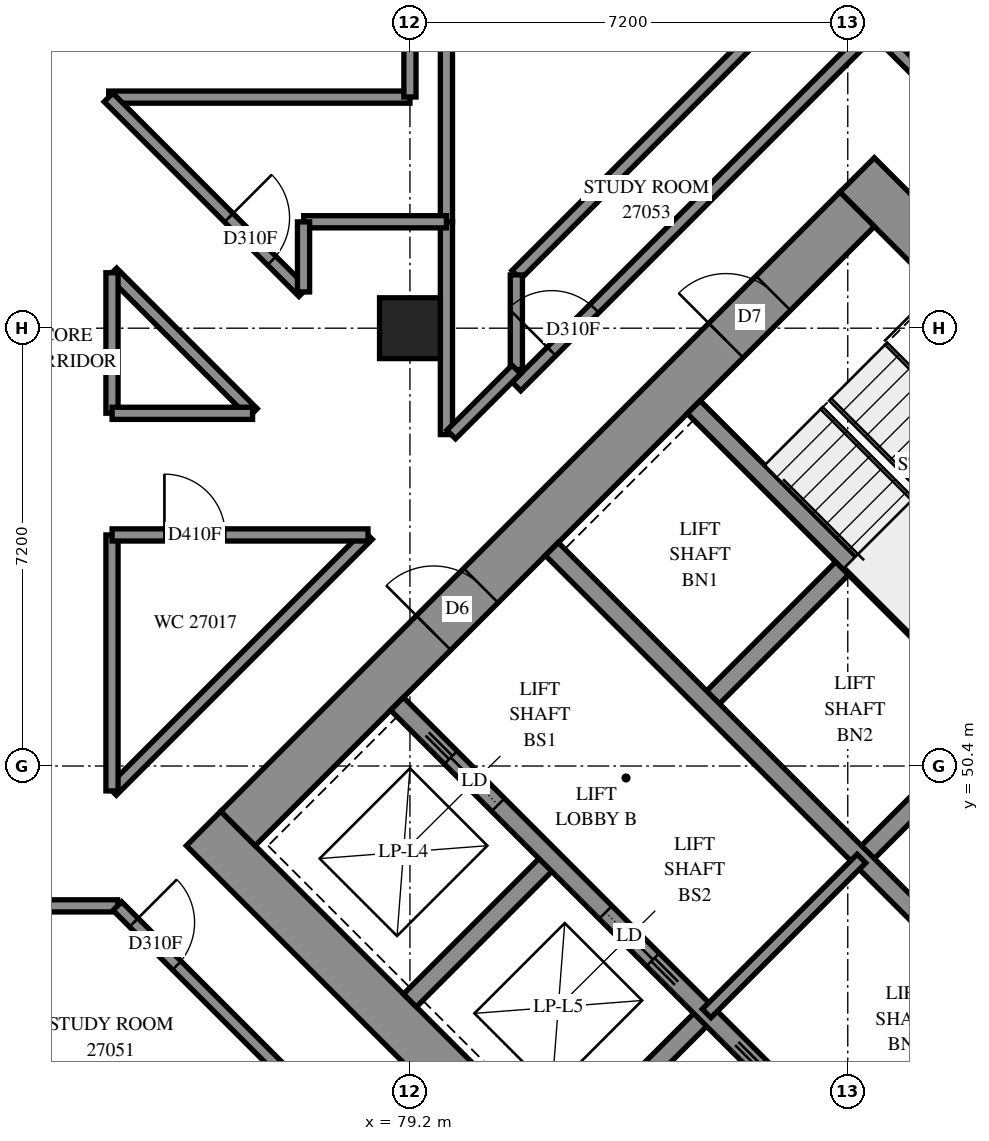
"""IFC4 building model, lengths in metres.
Left out: names, types, materials, properties, quantities, classifications, styles, units other than length and angle.
Written with IfcOpenShell. Run it as: python <this file> out.ifc"""

import sys

from ifc_helpers import new_model, si_unit, direction, frame, frame_2d, origin, origin_2d, place, context, subcontext, project, spatial, rectangle, extrude, element, fill, save


model = new_model("IFC4")
c1 = context("Model", 3, precision=1e-05, world=origin(), true_north=direction((0.0, 1.0)))
c2 = subcontext(c1, "Body", "Model", "MODEL_VIEW")
j1 = project(units=[si_unit("LENGTHUNIT", "METRE"), si_unit("PLANEANGLEUNIT", "RADIAN")], contexts=[c1])
p1 = place(None, origin())
s1 = spatial("IfcSite", under=j1, at=p1, CompositionType="ELEMENT")
p2 = place(p1, origin())
s2 = spatial("IfcBuilding", under=s1, at=p2, CompositionType="ELEMENT")
p3 = place(p2, frame((0.0, 0.0, 101.6)))
s3 = spatial("IfcBuildingStorey", under=s2, at=p3, CompositionType="ELEMENT", Elevation=101.6)
p4 = place(p3, frame((79.2, 57.6, 0.0), z_axis=(0.0, 0.0, 1.0), x_axis=(1.0, 0.0, 0.0)))
e1 = element("IfcColumn", 1, at=p4, inside=s3, PredefinedType="COLUMN", context=c2, shape_type="SweptSolid", body=[
    extrude(rectangle(XDim=1.0, YDim=1.0, at=origin_2d()), origin(), (0.0, 0.0, 1.0), 3.1),
])
p5 = place(p3, frame((75.806, 49.373, -0.3), z_axis=(0.0, 0.0, 1.0), x_axis=(0.7071067812, -0.7071067812, 0.0)))
e2 = element("IfcWall", 2, at=p5, inside=s3, PredefinedType="SHEAR", context=c2, shape_type="SweptSolid", body=[
    extrude(rectangle(XDim=16.0, YDim=0.8, at=frame_2d((8.0, 0.0))), origin(), (0.0, 0.0, 1.0), 2.7),
])
p6 = place(p3, frame((86.554, 60.121, -0.3), z_axis=(0.0, 0.0, 1.0), x_axis=(0.7071067812, -0.7071067812, 0.0)))
e3 = element("IfcWall", 3, at=p6, inside=s3, PredefinedType="SHEAR", context=c2, shape_type="SweptSolid", body=[
    extrude(rectangle(XDim=16.0, YDim=0.8, at=frame_2d((8.0, 0.0))), origin(), (0.0, 0.0, 1.0), 2.7),
])
p7 = place(p6, frame((10.8, 0.0, 0.3)))
e4 = element("IfcOpeningElement", 4, at=p7, cuts=e3, PredefinedType="OPENING", context=c2, shape_type="SweptSolid", body=[
    extrude(rectangle(XDim=0.8, YDim=2.1, at=frame_2d((0.4, 1.05))), frame((0.0, 0.41, 0.0), z_axis=(0.0, -1.0, 0.0), x_axis=(1.0, 0.0, 0.0)), (0.0, 0.0, 1.0), 0.82),
])
p8 = place(p3, frame((76.372, 49.373, -0.3), z_axis=(0.0, 0.0, 1.0), x_axis=(0.7071067812, 0.7071067812, 0.0)))
e5 = element("IfcWall", 5, at=p8, inside=s3, PredefinedType="SHEAR", context=c2, shape_type="SweptSolid", body=[
    extrude(rectangle(XDim=14.4, YDim=0.8, at=frame_2d((7.2, 0.0))), origin(), (0.0, 0.0, 1.0), 2.7),
])
p9 = place(p8, frame((4.55, 0.0, 0.3)))
e6 = element("IfcOpeningElement", 6, at=p9, cuts=e5, PredefinedType="OPENING", context=c2, shape_type="SweptSolid", body=[
    extrude(rectangle(XDim=1.1, YDim=2.1, at=frame_2d((0.55, 1.05))), frame((0.0, 0.41, 0.0), z_axis=(0.0, -1.0, 0.0), x_axis=(1.0, 0.0, 0.0)), (0.0, 0.0, 1.0), 0.82),
])
p10 = place(p8, frame((11.35, 0.0, 0.3)))
e7 = element("IfcOpeningElement", 7, at=p10, cuts=e5, PredefinedType="OPENING", context=c2, shape_type="SweptSolid", body=[
    extrude(rectangle(XDim=1.1, YDim=2.1, at=frame_2d((0.55, 1.05))), frame((0.0, 0.41, 0.0), z_axis=(0.0, -1.0, 0.0), x_axis=(1.0, 0.0, 0.0)), (0.0, 0.0, 1.0), 0.82),
])
p11 = place(p3, frame((87.12, 38.625, -0.3), z_axis=(0.0, 0.0, 1.0), x_axis=(0.7071067812, 0.7071067812, 0.0)))
e8 = element("IfcWall", 8, at=p11, inside=s3, PredefinedType="SHEAR", context=c2, shape_type="SweptSolid", body=[
    extrude(rectangle(XDim=14.4, YDim=0.8, at=frame_2d((7.2, 0.0))), origin(), (0.0, 0.0, 1.0), 2.7),
])
p12 = place(p11, frame((4.55, 0.0, 0.3)))
e9 = element("IfcOpeningElement", 9, at=p12, cuts=e8, PredefinedType="OPENING", context=c2, shape_type="SweptSolid", body=[
    extrude(rectangle(XDim=1.1, YDim=2.1, at=frame_2d((0.55, 1.05))), frame((0.0, 0.41, 0.0), z_axis=(0.0, -1.0, 0.0), x_axis=(1.0, 0.0, 0.0)), (0.0, 0.0, 1.0), 0.82),
])
p13 = place(p11, frame((11.35, 0.0, 0.3)))
e10 = element("IfcOpeningElement", 10, at=p13, cuts=e8, PredefinedType="OPENING", context=c2, shape_type="SweptSolid", body=[
    extrude(rectangle(XDim=1.1, YDim=2.1, at=frame_2d((0.55, 1.05))), frame((0.0, 0.41, 0.0), z_axis=(0.0, -1.0, 0.0), x_axis=(1.0, 0.0, 0.0)), (0.0, 0.0, 1.0), 0.82),
])
for number, where, z_axis, x_axis in (
    (11, (79.2, 46.544, 0.0), (0.0, 0.0, 1.0), (0.707, 0.707, 0.0)),
    (12, (84.079, 51.423, 0.0), (0.0, 0.0, 1.0), (0.707, 0.707, 0.0)),
):
    element("IfcWall", number, at=place(p3, frame(where, z_axis=z_axis, x_axis=x_axis)), inside=s3, PredefinedType="SOLIDWALL", context=c2, shape_type="SweptSolid", body=[
        extrude(rectangle(XDim=3.3, YDim=0.3, at=frame_2d((1.65, 0.0))), origin(), (0.0, 0.0, 1.0), 3.1),
    ])
p14 = place(p3, frame((81.746, 43.999, 0.0), z_axis=(0.0, 0.0, 1.0), x_axis=(0.7071067812, 0.7071067812, 0.0)))
e13 = element("IfcWall", 13, at=p14, inside=s3, PredefinedType="SOLIDWALL", context=c2, shape_type="SweptSolid", body=[
    extrude(rectangle(XDim=3.3, YDim=0.3, at=frame_2d((1.65, 0.0))), origin(), (0.0, 0.0, 1.0), 3.1),
])
p15 = place(p3, frame((86.625, 48.878, 0.0), z_axis=(0.0, 0.0, 1.0), x_axis=(0.7071067812, 0.7071067812, 0.0)))
e14 = element("IfcWall", 14, at=p15, inside=s3, PredefinedType="SOLIDWALL", context=c2, shape_type="SweptSolid", body=[
    extrude(rectangle(XDim=3.3, YDim=0.3, at=frame_2d((1.65, 0.0))), origin(), (0.0, 0.0, 1.0), 3.1),
])
p16 = place(p3, frame((78.988, 51.423, 0.0), z_axis=(0.0, 0.0, 1.0), x_axis=(0.7071067812, -0.7071067812, 0.0)))
e15 = element("IfcWall", 15, at=p16, inside=s3, PredefinedType="SOLIDWALL", context=c2, shape_type="SweptSolid", body=[
    extrude(rectangle(XDim=14.4, YDim=0.3, at=frame_2d((7.2, 0.0))), origin(), (0.0, 0.0, 1.0), 3.1),
])
p17 = place(p16, frame((1.25, 0.0, 0.0)))
e16 = element("IfcOpeningElement", 16, at=p17, cuts=e15, PredefinedType="OPENING", context=c2, shape_type="SweptSolid", body=[
    extrude(rectangle(XDim=1.1, YDim=2.1, at=frame_2d((0.55, 1.05))), frame((0.0, 0.16, 0.0), z_axis=(0.0, -1.0, 0.0), x_axis=(1.0, 0.0, 0.0)), (0.0, 0.0, 1.0), 0.32),
])
p18 = place(p16, frame((4.85, 0.0, 0.0)))
e17 = element("IfcOpeningElement", 17, at=p18, cuts=e15, PredefinedType="OPENING", context=c2, shape_type="SweptSolid", body=[
    extrude(rectangle(XDim=1.1, YDim=2.1, at=frame_2d((0.55, 1.05))), frame((0.0, 0.16, 0.0), z_axis=(0.0, -1.0, 0.0), x_axis=(1.0, 0.0, 0.0)), (0.0, 0.0, 1.0), 0.32),
])
p19 = place(p16, frame((8.45, 0.0, 0.0)))
e18 = element("IfcOpeningElement", 18, at=p19, cuts=e15, PredefinedType="OPENING", context=c2, shape_type="SweptSolid", body=[
    extrude(rectangle(XDim=1.1, YDim=2.1, at=frame_2d((0.55, 1.05))), frame((0.0, 0.16, 0.0), z_axis=(0.0, -1.0, 0.0), x_axis=(1.0, 0.0, 0.0)), (0.0, 0.0, 1.0), 0.32),
])
p20 = place(p16, frame((12.05, 0.0, 0.0)))
e19 = element("IfcOpeningElement", 19, at=p20, cuts=e15, PredefinedType="OPENING", context=c2, shape_type="SweptSolid", body=[
    extrude(rectangle(XDim=1.1, YDim=2.1, at=frame_2d((0.55, 1.05))), frame((0.0, 0.16, 0.0), z_axis=(0.0, -1.0, 0.0), x_axis=(1.0, 0.0, 0.0)), (0.0, 0.0, 1.0), 0.32),
])
p21 = place(p3, frame((81.534, 53.969, 0.0), z_axis=(0.0, 0.0, 1.0), x_axis=(0.707103309, -0.7071102534, 0.0)))
e20 = element("IfcWall", 20, at=p21, inside=s3, PredefinedType="SOLIDWALL", context=c2, shape_type="SweptSolid", body=[
    extrude(rectangle(XDim=14.4, YDim=0.3, at=frame_2d((7.2, 0.0))), origin(), (0.0, 0.0, 1.0), 3.1),
])
p22 = place(p21, frame((12.05, 0.0, 0.0)))
e21 = element("IfcOpeningElement", 21, at=p22, cuts=e20, PredefinedType="OPENING", context=c2, shape_type="SweptSolid", body=[
    extrude(rectangle(XDim=1.1, YDim=2.1, at=frame_2d((0.55, 1.05))), frame((0.0, 0.16, 0.0), z_axis=(0.0, -1.0, 0.0), x_axis=(1.0, 0.0, 0.0)), (0.0, 0.0, 1.0), 0.32),
])
p23 = place(p3, frame((83.867, 56.302, 0.0), z_axis=(0.0, 0.0, 1.0), x_axis=(0.7071137256, -0.7070998367, 0.0)))
e22 = element("IfcWall", 22, at=p23, inside=s3, PredefinedType="SOLIDWALL", context=c2, shape_type="SweptSolid", body=[
    extrude(rectangle(XDim=7.2, YDim=0.3, at=frame_2d((3.6, 0.0))), origin(), (0.0, 0.0, 1.0), 3.1),
])
p24 = place(p3, frame((84.079, 46.332, 0.0), z_axis=(0.0, 0.0, 1.0), x_axis=(0.7071067812, 0.7071067812, 0.0)))
e23 = element("IfcWall", 23, at=p24, inside=s3, PredefinedType="PARTITIONING", context=c2, shape_type="SweptSolid", body=[
    extrude(rectangle(XDim=3.6, YDim=0.2, at=frame_2d((1.8, 0.0))), origin(), (0.0, 0.0, 1.0), 3.1),
])
p25 = place(p3, frame((55.3, 48.1, 0.0), z_axis=(0.0, 0.0, 1.0), x_axis=(1.0, 0.0, 0.0)))
e24 = element("IfcWall", 24, at=p25, inside=s3, PredefinedType="PARTITIONING", context=c2, shape_type="SweptSolid", body=[
    extrude(rectangle(XDim=19.092, YDim=0.2, at=frame_2d((9.546, 0.0))), origin(), (0.0, 0.0, 1.0), 3.1),
])
p26 = place(p25, frame((4.6, 0.0, 0.0)))
e25 = element("IfcOpeningElement", 25, at=p26, cuts=e24, PredefinedType="OPENING", context=c2, shape_type="SweptSolid", body=[
    extrude(rectangle(XDim=0.9, YDim=2.1, at=frame_2d((0.45, 1.05))), frame((0.0, 0.11, 0.0), z_axis=(0.0, -1.0, 0.0), x_axis=(1.0, 0.0, 0.0)), (0.0, 0.0, 1.0), 0.22),
])
p27 = place(p25, frame((8.239, 0.0, 0.0)))
e26 = element("IfcOpeningElement", 26, at=p27, cuts=e24, PredefinedType="OPENING", context=c2, shape_type="SweptSolid", body=[
    extrude(rectangle(XDim=0.9, YDim=2.1, at=frame_2d((0.45, 1.05))), frame((0.0, 0.11, 0.0), z_axis=(0.0, -1.0, 0.0), x_axis=(1.0, 0.0, 0.0)), (0.0, 0.0, 1.0), 0.22),
])
p28 = place(p25, frame((13.5, 0.0, 0.0)))
e27 = element("IfcOpeningElement", 27, at=p28, cuts=e24, PredefinedType="OPENING", context=c2, shape_type="SweptSolid", body=[
    extrude(rectangle(XDim=0.9, YDim=2.1, at=frame_2d((0.45, 1.05))), frame((0.0, 0.11, 0.0), z_axis=(0.0, -1.0, 0.0), x_axis=(1.0, 0.0, 0.0)), (0.0, 0.0, 1.0), 0.22),
])
p29 = place(p3, frame((79.8, 59.35, 0.0), z_axis=(0.0, 0.0, 1.0), x_axis=(0.0, 1.0, 0.0)))
e28 = element("IfcWall", 28, at=p29, inside=s3, PredefinedType="PARTITIONING", context=c2, shape_type="SweptSolid", body=[
    extrude(rectangle(XDim=14.262, YDim=0.2, at=frame_2d((7.131, 0.0))), origin(), (0.0, 0.0, 1.0), 3.1),
])
p30 = place(p3, frame((80.949, 58.477, 0.0), z_axis=(0.0, 0.0, 1.0), x_axis=(0.7071122255, 0.7071013368, 0.0)))
e29 = element("IfcWall", 29, at=p30, inside=s3, PredefinedType="PARTITIONING", context=c2, shape_type="SweptSolid", body=[
    extrude(rectangle(XDim=9.184, YDim=0.2, at=frame_2d((4.592, 0.0))), origin(), (0.0, 0.0, 1.0), 3.1),
])
p31 = place(p3, frame((80.951, 56.641, 0.0), z_axis=(0.0, 0.0, 1.0), x_axis=(0.7071067812, 0.7071067812, 0.0)))
e30 = element("IfcWall", 30, at=p31, inside=s3, PredefinedType="PARTITIONING", context=c2, shape_type="SweptSolid", body=[
    extrude(rectangle(XDim=8.321, YDim=0.2, at=frame_2d((4.161, 0.0))), origin(), (0.0, 0.0, 1.0), 3.1),
])
p32 = place(p31, frame((0.816, 0.0, 0.0)))
e31 = element("IfcOpeningElement", 31, at=p32, cuts=e30, PredefinedType="OPENING", context=c2, shape_type="SweptSolid", body=[
    extrude(rectangle(XDim=1.0, YDim=2.1, at=frame_2d((0.5, 1.05))), frame((0.0, 0.11, 0.0), z_axis=(0.0, -1.0, 0.0), x_axis=(1.0, 0.0, 0.0)), (0.0, 0.0, 1.0), 0.22),
])
p33 = place(p3, frame((74.301, 49.991, 0.0), z_axis=(0.0, 0.0, 1.0), x_axis=(0.7071067812, 0.7071067812, 0.0)))
e32 = element("IfcWall", 32, at=p33, inside=s3, PredefinedType="PARTITIONING", context=c2, shape_type="SweptSolid", body=[
    extrude(rectangle(XDim=5.951, YDim=0.2, at=frame_2d((2.975, 0.0))), origin(), (0.0, 0.0, 1.0), 3.1),
])
p34 = place(p3, frame((74.246, 61.4, 0.0), z_axis=(0.0, 0.0, 1.0), x_axis=(1.0, 0.0, 0.0)))
e33 = element("IfcWall", 33, at=p34, inside=s3, PredefinedType="PARTITIONING", context=c2, shape_type="SweptSolid", body=[
    extrude(rectangle(XDim=4.954, YDim=0.2, at=frame_2d((2.477, 0.0))), origin(), (0.0, 0.0, 1.0), 3.1),
])
p35 = place(p3, frame((74.243, 61.395, 0.0), z_axis=(0.0, 0.0, 1.0), x_axis=(0.7071067812, -0.7071067812, 0.0)))
e34 = element("IfcWall", 34, at=p35, inside=s3, PredefinedType="PARTITIONING", context=c2, shape_type="SweptSolid", body=[
    extrude(rectangle(XDim=4.528, YDim=0.2, at=frame_2d((2.264, 0.0))), origin(), (0.0, 0.0, 1.0), 3.1),
])
p36 = place(p35, frame((2.797, 0.0, 0.0)))
e35 = element("IfcOpeningElement", 35, at=p36, cuts=e34, PredefinedType="OPENING", context=c2, shape_type="SweptSolid", body=[
    extrude(rectangle(XDim=1.0, YDim=2.1, at=frame_2d((0.5, 1.05))), frame((0.0, 0.11, 0.0), z_axis=(0.0, -1.0, 0.0), x_axis=(1.0, 0.0, 0.0)), (0.0, 0.0, 1.0), 0.22),
])
p37 = place(p3, frame((74.388, 48.096, 0.0), z_axis=(0.0, 0.0, 1.0), x_axis=(0.7071067812, -0.7071067812, 0.0)))
e36 = element("IfcWall", 36, at=p37, inside=s3, PredefinedType="PARTITIONING", context=c2, shape_type="SweptSolid", body=[
    extrude(rectangle(XDim=4.452, YDim=0.2, at=frame_2d((2.226, 0.0))), origin(), (0.0, 0.0, 1.0), 3.1),
])
p38 = place(p37, frame((0.382, 0.0, 0.0)))
e37 = element("IfcOpeningElement", 37, at=p38, cuts=e36, PredefinedType="OPENING", context=c2, shape_type="SweptSolid", body=[
    extrude(rectangle(XDim=1.0, YDim=2.1, at=frame_2d((0.5, 1.05))), frame((0.0, 0.11, 0.0), z_axis=(0.0, -1.0, 0.0), x_axis=(1.0, 0.0, 0.0)), (0.0, 0.0, 1.0), 0.22),
])
p39 = place(p3, frame((74.3, 49.99, 0.0), z_axis=(0.0, 0.0, 1.0), x_axis=(0.0, 1.0, 0.0)))
e38 = element("IfcWall", 38, at=p39, inside=s3, PredefinedType="PARTITIONING", context=c2, shape_type="SweptSolid", body=[
    extrude(rectangle(XDim=4.21, YDim=0.2, at=frame_2d((2.105, 0.0))), origin(), (0.0, 0.0, 1.0), 3.1),
])
p40 = place(p3, frame((74.302, 54.2, 0.0), z_axis=(0.0, 0.0, 1.0), x_axis=(1.0, 0.0, 0.0)))
e39 = element("IfcWall", 39, at=p40, inside=s3, PredefinedType="PARTITIONING", context=c2, shape_type="SweptSolid", body=[
    extrude(rectangle(XDim=4.208, YDim=0.2, at=frame_2d((2.104, 0.0))), origin(), (0.0, 0.0, 1.0), 3.1),
])
p41 = place(p40, frame((0.86, 0.0, 0.0)))
e40 = element("IfcOpeningElement", 40, at=p41, cuts=e39, PredefinedType="OPENING", context=c2, shape_type="SweptSolid", body=[
    extrude(rectangle(XDim=1.0, YDim=2.1, at=frame_2d((0.5, 1.05))), frame((0.0, 0.11, 0.0), z_axis=(0.0, -1.0, 0.0), x_axis=(1.0, 0.0, 0.0)), (0.0, 0.0, 1.0), 0.22),
])
p42 = place(p3, frame((79.8, 55.85, 0.0), z_axis=(0.0, 0.0, 1.0), x_axis=(0.0, 1.0, 0.0)))
e41 = element("IfcWall", 41, at=p42, inside=s3, PredefinedType="PARTITIONING", context=c2, shape_type="SweptSolid", body=[
    extrude(rectangle(XDim=3.5, YDim=0.2, at=frame_2d((1.75, 0.0))), origin(), (0.0, 0.0, 1.0), 3.1),
])
p43 = place(p3, frame((74.305, 58.517, 0.0), z_axis=(0.0, 0.0, 1.0), x_axis=(0.7071067812, -0.7071067812, 0.0)))
e42 = element("IfcWall", 42, at=p43, inside=s3, PredefinedType="PARTITIONING", context=c2, shape_type="SweptSolid", body=[
    extrude(rectangle(XDim=3.27, YDim=0.2, at=frame_2d((1.635, 0.0))), origin(), (0.0, 0.0, 1.0), 3.1),
])
p44 = place(p3, frame((77.452, 59.35, 0.0), z_axis=(0.0, 0.0, 1.0), x_axis=(1.0, 0.0, 0.0)))
e43 = element("IfcWall", 43, at=p44, inside=s3, PredefinedType="PARTITIONING", context=c2, shape_type="SweptSolid", body=[
    extrude(rectangle(XDim=2.348, YDim=0.2, at=frame_2d((1.174, 0.0))), origin(), (0.0, 0.0, 1.0), 3.1),
])
for number, where, z_axis, x_axis in (
    (44, (74.3, 56.202, 0.0), (0.0, 0.0, 1.0), (0.0, 1.0, 0.0)),
    (45, (74.302, 56.2, 0.0), (0.0, 0.0, 1.0), (1.0, 0.0, 0.0)),
):
    element("IfcWall", number, at=place(p3, frame(where, z_axis=z_axis, x_axis=x_axis)), inside=s3, PredefinedType="PARTITIONING", context=c2, shape_type="SweptSolid", body=[
        extrude(rectangle(XDim=2.31, YDim=0.2, at=frame_2d((1.155, 0.0))), origin(), (0.0, 0.0, 1.0), 3.1),
    ])
p45 = place(p3, frame((79.2, 61.402, 0.0), z_axis=(0.0, 0.0, 1.0), x_axis=(0.0, 1.0, 0.0)))
e46 = element("IfcWall", 46, at=p45, inside=s3, PredefinedType="PARTITIONING", context=c2, shape_type="SweptSolid", body=[
    extrude(rectangle(XDim=1.996, YDim=0.2, at=frame_2d((0.998, 0.0))), origin(), (0.0, 0.0, 1.0), 3.1),
])
p46 = place(p3, frame((80.95, 56.92, 0.0), z_axis=(0.0, 0.0, 1.0), x_axis=(0.0, 1.0, 0.0)))
e47 = element("IfcWall", 47, at=p46, inside=s3, PredefinedType="PARTITIONING", context=c2, shape_type="SweptSolid", body=[
    extrude(rectangle(XDim=1.556, YDim=0.2, at=frame_2d((0.778, 0.0))), origin(), (0.0, 0.0, 1.0), 3.1),
])
p47 = place(p3, frame((79.879, 55.851, 0.0), z_axis=(0.0, 0.0, 1.0), x_axis=(0.7071067812, 0.7071067812, 0.0)))
e48 = element("IfcWall", 48, at=p47, inside=s3, PredefinedType="PARTITIONING", context=c2, shape_type="SweptSolid", body=[
    extrude(rectangle(XDim=1.513, YDim=0.2, at=frame_2d((0.757, 0.0))), origin(), (0.0, 0.0, 1.0), 3.1),
])
p48 = place(p3, frame((86.838, 62.526, 0.0), z_axis=(0.0, 0.0, 1.0), x_axis=(0.70777292, -0.7064400143, 0.0)))
e49 = element("IfcWall", 49, at=p48, inside=s3, PredefinedType="PARTITIONING", context=c2, shape_type="SweptSolid", body=[
    extrude(rectangle(XDim=1.5, YDim=0.2, at=frame_2d((0.75, 0.0))), origin(), (0.0, 0.0, 1.0), 3.1),
])
p49 = place(p3, frame((77.45, 58.196, 0.0), z_axis=(0.0, 0.0, 1.0), x_axis=(0.0, 1.0, 0.0)))
e50 = element("IfcWall", 50, at=p49, inside=s3, PredefinedType="PARTITIONING", context=c2, shape_type="SweptSolid", body=[
    extrude(rectangle(XDim=1.152, YDim=0.2, at=frame_2d((0.576, 0.0))), origin(), (0.0, 0.0, 1.0), 3.1),
])
p50 = place(p9, origin())
e51 = element("IfcDoor", 51, at=p50, inside=s3, OperationType="DOUBLE_DOOR_SINGLE_SWING", PredefinedType="DOOR", context=c2, shape_type="SweptSolid", body=[
    extrude(rectangle(XDim=1.1, YDim=2.1, at=frame_2d((0.55, 1.05))), frame((0.0, 0.025, 0.0), z_axis=(0.0, -1.0, 0.0), x_axis=(1.0, 0.0, 0.0)), (0.0, 0.0, 1.0), 0.05),
])
fill(e6, e51)
p51 = place(p10, origin())
e52 = element("IfcDoor", 52, at=p51, inside=s3, OperationType="SINGLE_SWING_LEFT", PredefinedType="DOOR", context=c2, shape_type="SweptSolid", body=[
    extrude(rectangle(XDim=1.1, YDim=2.1, at=frame_2d((0.55, 1.05))), frame((0.0, 0.025, 0.0), z_axis=(0.0, -1.0, 0.0), x_axis=(1.0, 0.0, 0.0)), (0.0, 0.0, 1.0), 0.05),
])
fill(e7, e52)
p52 = place(p17, origin())
e53 = element("IfcDoor", 53, at=p52, inside=s3, OperationType="SLIDING_TO_LEFT", PredefinedType="DOOR", context=c2, shape_type="SweptSolid", body=[
    extrude(rectangle(XDim=1.1, YDim=2.1, at=frame_2d((0.55, 1.05))), frame((0.0, 0.025, 0.0), z_axis=(0.0, -1.0, 0.0), x_axis=(1.0, 0.0, 0.0)), (0.0, 0.0, 1.0), 0.05),
])
fill(e16, e53)
p53 = place(p18, origin())
e54 = element("IfcDoor", 54, at=p53, inside=s3, OperationType="SLIDING_TO_RIGHT", PredefinedType="DOOR", context=c2, shape_type="SweptSolid", body=[
    extrude(rectangle(XDim=1.1, YDim=2.1, at=frame_2d((0.55, 1.05))), frame((0.0, 0.025, 0.0), z_axis=(0.0, -1.0, 0.0), x_axis=(1.0, 0.0, 0.0)), (0.0, 0.0, 1.0), 0.05),
])
fill(e17, e54)
p54 = place(p41, origin())
e55 = element("IfcDoor", 55, at=p54, inside=s3, OperationType="SINGLE_SWING_RIGHT", PredefinedType="DOOR", context=c2, shape_type="SweptSolid", body=[
    extrude(rectangle(XDim=1.0, YDim=2.1, at=frame_2d((0.5, 1.05))), frame((0.0, 0.025, 0.0), z_axis=(0.0, -1.0, 0.0), x_axis=(1.0, 0.0, 0.0)), (0.0, 0.0, 1.0), 0.05),
])
fill(e40, e55)
p55 = place(p38, origin())
e56 = element("IfcDoor", 56, at=p55, inside=s3, OperationType="SINGLE_SWING_LEFT", PredefinedType="DOOR", context=c2, shape_type="SweptSolid", body=[
    extrude(rectangle(XDim=1.0, YDim=2.1, at=frame_2d((0.5, 1.05))), frame((0.0, 0.025, 0.0), z_axis=(0.0, -1.0, 0.0), x_axis=(1.0, 0.0, 0.0)), (0.0, 0.0, 1.0), 0.05),
])
fill(e37, e56)
p56 = place(p36, origin())
e57 = element("IfcDoor", 57, at=p56, inside=s3, OperationType="SINGLE_SWING_LEFT", PredefinedType="DOOR", context=c2, shape_type="SweptSolid", body=[
    extrude(rectangle(XDim=1.0, YDim=2.1, at=frame_2d((0.5, 1.05))), frame((0.0, 0.025, 0.0), z_axis=(0.0, -1.0, 0.0), x_axis=(1.0, 0.0, 0.0)), (0.0, 0.0, 1.0), 0.05),
])
fill(e35, e57)
p57 = place(p32, origin())
e58 = element("IfcDoor", 58, at=p57, inside=s3, OperationType="SINGLE_SWING_RIGHT", PredefinedType="DOOR", context=c2, shape_type="SweptSolid", body=[
    extrude(rectangle(XDim=1.0, YDim=2.1, at=frame_2d((0.5, 1.05))), frame((0.0, 0.025, 0.0), z_axis=(0.0, -1.0, 0.0), x_axis=(1.0, 0.0, 0.0)), (0.0, 0.0, 1.0), 0.05),
])
fill(e31, e58)
save(model, sys.argv[1])
